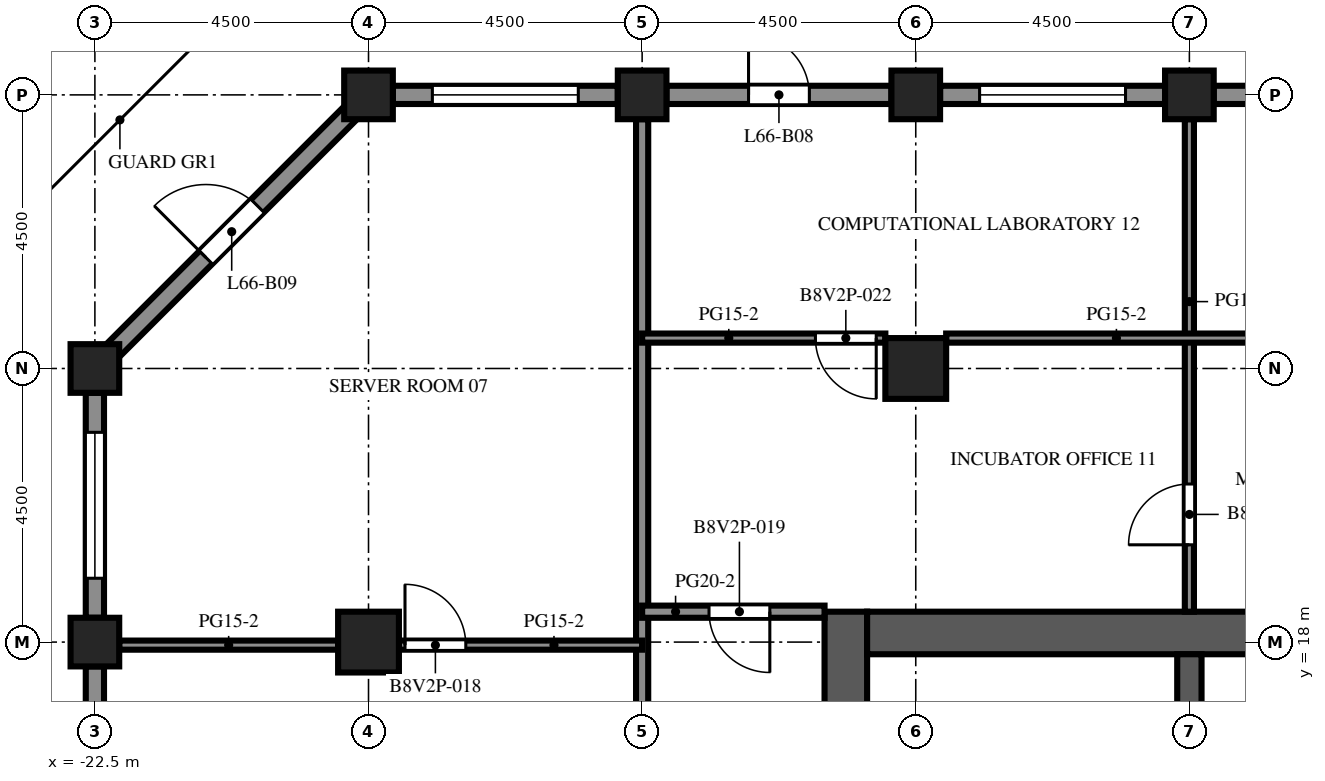
"""IFC4 building model, lengths in metres.
Left out: names, types, materials, properties, quantities, classifications, styles, units other than length and angle.
Written with IfcOpenShell. Run it as: python <this file> out.ifc"""

import sys

from ifc_helpers import new_model, si_unit, direction, frame, frame_2d, origin, origin_2d, place, context, subcontext, project, spatial, rectangle, extrude, element, fill, save


model = new_model("IFC4")
c1 = context("Model", 3, precision=1e-05, world=origin(), true_north=direction((0.0, 1.0)))
c2 = subcontext(c1, "Body", "Model", "MODEL_VIEW")
j1 = project(units=[si_unit("LENGTHUNIT", "METRE"), si_unit("PLANEANGLEUNIT", "RADIAN")], contexts=[c1])
p1 = place(None, origin())
s1 = spatial("IfcSite", under=j1, at=p1, CompositionType="ELEMENT")
p2 = place(p1, origin())
s2 = spatial("IfcBuilding", under=s1, at=p2, CompositionType="ELEMENT")
p3 = place(p2, frame((0.0, 0.0, 290.9)))
s3 = spatial("IfcBuildingStorey", under=s2, at=p3, CompositionType="ELEMENT", Elevation=290.9)
for number, where, z_axis, x_axis in (
    (1, (-22.5, 18.0, 0.0), (0.0, 0.0, 1.0), (1.0, 0.0, 0.0)),
    (2, (-22.5, 22.5, 0.0), (0.0, 0.0, 1.0), (1.0, 0.0, 0.0)),
    (3, (-18.0, 27.0, 0.0), (0.0, 0.0, 1.0), (1.0, 0.0, 0.0)),
    (4, (-13.5, 27.0, 0.0), (0.0, 0.0, 1.0), (1.0, 0.0, 0.0)),
    (5, (-9.0, 27.0, 0.0), (0.0, 0.0, 1.0), (1.0, 0.0, 0.0)),
    (6, (-4.5, 27.0, 0.0), (0.0, 0.0, 1.0), (1.0, 0.0, 0.0)),
):
    element("IfcColumn", number, at=place(p3, frame(where, z_axis=z_axis, x_axis=x_axis)), inside=s3, PredefinedType="COLUMN", context=c2, shape_type="SweptSolid", body=[
        extrude(rectangle(XDim=0.8, YDim=0.8, at=origin_2d()), origin(), (0.0, 0.0, 1.0), 4.1),
    ])
for number, where, z_axis, x_axis in (
    (7, (-18.0, 18.0, 0.0), (0.0, 0.0, 1.0), (1.0, 0.0, 0.0)),
    (8, (-9.0, 22.5, 0.0), (0.0, 0.0, 1.0), (1.0, 0.0, 0.0)),
):
    element("IfcColumn", number, at=place(p3, frame(where, z_axis=z_axis, x_axis=x_axis)), inside=s3, PredefinedType="COLUMN", context=c2, shape_type="SweptSolid", body=[
        extrude(rectangle(XDim=1.0, YDim=1.0, at=origin_2d()), origin(), (0.0, 0.0, 1.0), 4.1),
    ])
p4 = place(p3, frame((-10.15, -9.0, 0.0), z_axis=(0.0, 0.0, 1.0), x_axis=(0.0, 1.0, 0.0)))
e9 = element("IfcWall", 9, at=p4, inside=s3, PredefinedType="SHEAR", context=c2, shape_type="SweptSolid", body=[
    extrude(rectangle(XDim=27.5, YDim=0.7, at=frame_2d((13.75, 0.0))), origin(), (0.0, 0.0, 1.0), 4.1),
])
p5 = place(p4, frame((12.55, 0.0, 0.0)))
e10 = element("IfcOpeningElement", 10, at=p5, cuts=e9, PredefinedType="OPENING", context=c2, shape_type="SweptSolid", body=[
    extrude(rectangle(XDim=2.4, YDim=2.4, at=frame_2d((1.2, 1.2))), frame((0.0, 0.36, 0.0), z_axis=(0.0, -1.0, 0.0), x_axis=(1.0, 0.0, 0.0)), (0.0, 0.0, 1.0), 0.72),
])
p6 = place(p4, frame((6.825, 0.0, 0.0)))
e11 = element("IfcOpeningElement", 11, at=p6, cuts=e9, PredefinedType="OPENING", context=c2, shape_type="SweptSolid", body=[
    extrude(rectangle(XDim=1.2, YDim=2.1, at=frame_2d((0.6, 1.05))), frame((0.0, 0.36, 0.0), z_axis=(0.0, -1.0, 0.0), x_axis=(1.0, 0.0, 0.0)), (0.0, 0.0, 1.0), 0.72),
])
p7 = place(p4, frame((19.475, 0.0, 0.0)))
e12 = element("IfcOpeningElement", 12, at=p7, cuts=e9, PredefinedType="OPENING", context=c2, shape_type="SweptSolid", body=[
    extrude(rectangle(XDim=1.2, YDim=2.1, at=frame_2d((0.6, 1.05))), frame((0.0, 0.36, 0.0), z_axis=(0.0, -1.0, 0.0), x_axis=(1.0, 0.0, 0.0)), (0.0, 0.0, 1.0), 0.72),
])
p8 = place(p3, frame((-9.8, 18.15, 0.0), z_axis=(0.0, 0.0, 1.0), x_axis=(1.0, 0.0, 0.0)))
e13 = element("IfcWall", 13, at=p8, inside=s3, PredefinedType="SHEAR", context=c2, shape_type="SweptSolid", body=[
    extrude(rectangle(XDim=10.6, YDim=0.7, at=frame_2d((5.3, 0.0))), origin(), (0.0, 0.0, 1.0), 4.1),
])
p9 = place(p3, frame((-4.5, 10.2, 0.0), z_axis=(0.0, 0.0, 1.0), x_axis=(0.0, 1.0, 0.0)))
e14 = element("IfcWall", 14, at=p9, inside=s3, PredefinedType="SHEAR", context=c2, shape_type="SweptSolid", body=[
    extrude(rectangle(XDim=7.6, YDim=0.4, at=frame_2d((3.8, 0.0))), origin(), (0.0, 0.0, 1.0), 4.1),
])
p10 = place(p3, frame((-4.1, 27.0, 0.0), z_axis=(0.0, 0.0, 1.0), x_axis=(1.0, 0.0, 0.0)))
e15 = element("IfcWall", 15, at=p10, inside=s3, PredefinedType="SOLIDWALL", context=c2, shape_type="SweptSolid", body=[
    extrude(rectangle(XDim=3.7, YDim=0.3, at=frame_2d((1.85, 0.0))), origin(), (0.0, 0.0, 1.0), 2.7),
])
p11 = place(p10, frame((0.65, 0.0, 0.8)))
e16 = element("IfcOpeningElement", 16, at=p11, cuts=e15, PredefinedType="OPENING", context=c2, shape_type="SweptSolid", body=[
    extrude(rectangle(XDim=2.4, YDim=1.7, at=frame_2d((1.2, 0.85))), frame((0.0, 0.16, 0.0), z_axis=(0.0, -1.0, 0.0), x_axis=(1.0, 0.0, 0.0)), (0.0, 0.0, 1.0), 0.32),
])
p12 = place(p3, frame((-8.6, 27.0, 0.0), z_axis=(0.0, 0.0, 1.0), x_axis=(1.0, 0.0, 0.0)))
e17 = element("IfcWall", 17, at=p12, inside=s3, PredefinedType="SOLIDWALL", context=c2, shape_type="SweptSolid", body=[
    extrude(rectangle(XDim=3.7, YDim=0.3, at=frame_2d((1.85, 0.0))), origin(), (0.0, 0.0, 1.0), 2.7),
])
p13 = place(p12, frame((0.65, 0.0, 0.8)))
e18 = element("IfcOpeningElement", 18, at=p13, cuts=e17, PredefinedType="OPENING", context=c2, shape_type="SweptSolid", body=[
    extrude(rectangle(XDim=2.4, YDim=1.7, at=frame_2d((1.2, 0.85))), frame((0.0, 0.16, 0.0), z_axis=(0.0, -1.0, 0.0), x_axis=(1.0, 0.0, 0.0)), (0.0, 0.0, 1.0), 0.32),
])
p14 = place(p3, frame((-13.1, 27.0, 0.0), z_axis=(0.0, 0.0, 1.0), x_axis=(1.0, 0.0, 0.0)))
e19 = element("IfcWall", 19, at=p14, inside=s3, PredefinedType="SOLIDWALL", context=c2, shape_type="SweptSolid", body=[
    extrude(rectangle(XDim=3.7, YDim=0.3, at=frame_2d((1.85, 0.0))), origin(), (0.0, 0.0, 1.0), 2.7),
])
p15 = place(p14, frame((1.35, 0.0, 0.0)))
e20 = element("IfcOpeningElement", 20, at=p15, cuts=e19, PredefinedType="OPENING", context=c2, shape_type="SweptSolid", body=[
    extrude(rectangle(XDim=1.0, YDim=2.2, at=frame_2d((0.5, 1.1))), frame((0.0, 0.16, 0.0), z_axis=(0.0, -1.0, 0.0), x_axis=(1.0, 0.0, 0.0)), (0.0, 0.0, 1.0), 0.32),
])
p16 = place(p3, frame((-17.6, 27.0, 0.0), z_axis=(0.0, 0.0, 1.0), x_axis=(1.0, 0.0, 0.0)))
e21 = element("IfcWall", 21, at=p16, inside=s3, PredefinedType="SOLIDWALL", context=c2, shape_type="SweptSolid", body=[
    extrude(rectangle(XDim=3.7, YDim=0.3, at=frame_2d((1.85, 0.0))), origin(), (0.0, 0.0, 1.0), 2.7),
])
p17 = place(p16, frame((0.65, 0.0, 0.8)))
e22 = element("IfcOpeningElement", 22, at=p17, cuts=e21, PredefinedType="OPENING", context=c2, shape_type="SweptSolid", body=[
    extrude(rectangle(XDim=2.4, YDim=1.7, at=frame_2d((1.2, 0.85))), frame((0.0, 0.16, 0.0), z_axis=(0.0, -1.0, 0.0), x_axis=(1.0, 0.0, 0.0)), (0.0, 0.0, 1.0), 0.32),
])
p18 = place(p3, frame((-22.206, 22.794, 0.0), z_axis=(0.0, 0.0, 1.0), x_axis=(0.707106781187, 0.707106781187, 0.0)))
e23 = element("IfcWall", 23, at=p18, inside=s3, PredefinedType="SOLIDWALL", context=c2, shape_type="SweptSolid", body=[
    extrude(rectangle(XDim=5.532, YDim=0.3, at=frame_2d((2.766, 0.0))), origin(), (0.0, 0.0, 1.0), 2.7),
])
p19 = place(p18, frame((2.166, 0.0, 0.0)))
e24 = element("IfcOpeningElement", 24, at=p19, cuts=e23, PredefinedType="OPENING", context=c2, shape_type="SweptSolid", body=[
    extrude(rectangle(XDim=1.2, YDim=2.2, at=frame_2d((0.6, 1.1))), frame((0.0, 0.16, 0.0), z_axis=(0.0, -1.0, 0.0), x_axis=(1.0, 0.0, 0.0)), (0.0, 0.0, 1.0), 0.32),
])
p20 = place(p3, frame((-22.5, 18.4, 0.0), z_axis=(0.0, 0.0, 1.0), x_axis=(0.0, 1.0, 0.0)))
e25 = element("IfcWall", 25, at=p20, inside=s3, PredefinedType="SOLIDWALL", context=c2, shape_type="SweptSolid", body=[
    extrude(rectangle(XDim=3.7, YDim=0.3, at=frame_2d((1.85, 0.0))), origin(), (0.0, 0.0, 1.0), 2.7),
])
p21 = place(p20, frame((0.65, 0.0, 0.8)))
e26 = element("IfcOpeningElement", 26, at=p21, cuts=e25, PredefinedType="OPENING", context=c2, shape_type="SweptSolid", body=[
    extrude(rectangle(XDim=2.4, YDim=1.7, at=frame_2d((1.2, 0.85))), frame((0.0, 0.16, 0.0), z_axis=(0.0, -1.0, 0.0), x_axis=(1.0, 0.0, 0.0)), (0.0, 0.0, 1.0), 0.32),
])
p22 = place(p3, frame((-22.5, 13.9, 0.0), z_axis=(0.0, 0.0, 1.0), x_axis=(0.0, 1.0, 0.0)))
e27 = element("IfcWall", 27, at=p22, inside=s3, PredefinedType="SOLIDWALL", context=c2, shape_type="SweptSolid", body=[
    extrude(rectangle(XDim=3.7, YDim=0.3, at=frame_2d((1.85, 0.0))), origin(), (0.0, 0.0, 1.0), 2.7),
])
p23 = place(p22, frame((1.35, 0.0, 0.0)))
e28 = element("IfcOpeningElement", 28, at=p23, cuts=e27, PredefinedType="OPENING", context=c2, shape_type="SweptSolid", body=[
    extrude(rectangle(XDim=1.0, YDim=2.2, at=frame_2d((0.5, 1.1))), frame((0.0, 0.16, 0.0), z_axis=(0.0, -1.0, 0.0), x_axis=(1.0, 0.0, 0.0)), (0.0, 0.0, 1.0), 0.32),
])
p24 = place(p3, frame((-13.5, 6.25, 0.0), z_axis=(0.0, 0.0, 1.0), x_axis=(0.0, 1.0, 0.0)))
e29 = element("IfcWall", 29, at=p24, inside=s3, PredefinedType="PARTITIONING", context=c2, shape_type="SweptSolid", body=[
    extrude(rectangle(XDim=20.35, YDim=0.2, at=frame_2d((10.175, 0.0))), origin(), (0.0, 0.0, 1.0), 3.5),
])
p25 = place(p3, frame((-4.5, 26.6, 0.0), z_axis=(0.0, 0.0, 1.0), x_axis=(0.0, -1.0, 0.0)))
e30 = element("IfcWall", 30, at=p25, inside=s3, PredefinedType="PARTITIONING", context=c2, shape_type="SweptSolid", body=[
    extrude(rectangle(XDim=8.1, YDim=0.15, at=frame_2d((4.05, 0.0))), origin(), (0.0, 0.0, 1.0), 3.5),
])
p26 = place(p25, frame((6.0, 0.0, 0.0)))
e31 = element("IfcOpeningElement", 31, at=p26, cuts=e30, PredefinedType="OPENING", context=c2, shape_type="SweptSolid", body=[
    extrude(rectangle(XDim=1.0, YDim=2.1, at=frame_2d((0.5, 1.05))), frame((0.0, 0.085, 0.0), z_axis=(0.0, -1.0, 0.0), x_axis=(1.0, 0.0, 0.0)), (0.0, 0.0, 1.0), 0.17),
])
p27 = place(p3, frame((-22.1, 17.95, 0.0), z_axis=(0.0, 0.0, 1.0), x_axis=(1.0, 0.0, 0.0)))
e32 = element("IfcWall", 32, at=p27, inside=s3, PredefinedType="PARTITIONING", context=c2, shape_type="SweptSolid", body=[
    extrude(rectangle(XDim=3.6, YDim=0.15, at=frame_2d((1.8, 0.0))), origin(), (0.0, 0.0, 1.0), 3.5),
])
p28 = place(p3, frame((-17.5, 17.95, 0.0), z_axis=(0.0, 0.0, 1.0), x_axis=(1.0, 0.0, 0.0)))
e33 = element("IfcWall", 33, at=p28, inside=s3, PredefinedType="PARTITIONING", context=c2, shape_type="SweptSolid", body=[
    extrude(rectangle(XDim=4.0, YDim=0.15, at=frame_2d((2.0, 0.0))), origin(), (0.0, 0.0, 1.0), 3.5),
])
p29 = place(p28, frame((0.1, 0.0, 0.0)))
e34 = element("IfcOpeningElement", 34, at=p29, cuts=e33, PredefinedType="OPENING", context=c2, shape_type="SweptSolid", body=[
    extrude(rectangle(XDim=1.0, YDim=2.1, at=frame_2d((0.5, 1.05))), frame((0.0, 0.085, 0.0), z_axis=(0.0, -1.0, 0.0), x_axis=(1.0, 0.0, 0.0)), (0.0, 0.0, 1.0), 0.17),
])
p30 = place(p3, frame((-13.5, 18.5, 0.0), z_axis=(0.0, 0.0, 1.0), x_axis=(1.0, 0.0, 0.0)))
e35 = element("IfcWall", 35, at=p30, inside=s3, PredefinedType="PARTITIONING", context=c2, shape_type="SweptSolid", body=[
    extrude(rectangle(XDim=3.0, YDim=0.2, at=frame_2d((1.5, 0.0))), origin(), (0.0, 0.0, 1.0), 3.5),
])
p31 = place(p30, frame((1.1, 0.0, 0.0)))
e36 = element("IfcOpeningElement", 36, at=p31, cuts=e35, PredefinedType="OPENING", context=c2, shape_type="SweptSolid", body=[
    extrude(rectangle(XDim=1.0, YDim=2.1, at=frame_2d((0.5, 1.05))), frame((0.0, 0.11, 0.0), z_axis=(0.0, -1.0, 0.0), x_axis=(1.0, 0.0, 0.0)), (0.0, 0.0, 1.0), 0.22),
])
p32 = place(p3, frame((-13.5, 23.0, 0.0), z_axis=(0.0, 0.0, 1.0), x_axis=(1.0, 0.0, 0.0)))
e37 = element("IfcWall", 37, at=p32, inside=s3, PredefinedType="PARTITIONING", context=c2, shape_type="SweptSolid", body=[
    extrude(rectangle(XDim=4.0, YDim=0.15, at=frame_2d((2.0, 0.0))), origin(), (0.0, 0.0, 1.0), 3.5),
])
p33 = place(p32, frame((2.85, 0.0, 0.0)))
e38 = element("IfcOpeningElement", 38, at=p33, cuts=e37, PredefinedType="OPENING", context=c2, shape_type="SweptSolid", body=[
    extrude(rectangle(XDim=1.0, YDim=2.1, at=frame_2d((0.5, 1.05))), frame((0.0, 0.085, 0.0), z_axis=(0.0, -1.0, 0.0), x_axis=(1.0, 0.0, 0.0)), (0.0, 0.0, 1.0), 0.17),
])
p34 = place(p3, frame((-8.5, 23.0, 0.0), z_axis=(0.0, 0.0, 1.0), x_axis=(1.0, 0.0, 0.0)))
e39 = element("IfcWall", 39, at=p34, inside=s3, PredefinedType="PARTITIONING", context=c2, shape_type="SweptSolid", body=[
    extrude(rectangle(XDim=8.0, YDim=0.15, at=frame_2d((4.0, 0.0))), origin(), (0.0, 0.0, 1.0), 3.5),
])
p35 = place(p34, frame((5.6, 0.0, 0.0)))
e40 = element("IfcOpeningElement", 40, at=p35, cuts=e39, PredefinedType="OPENING", context=c2, shape_type="SweptSolid", body=[
    extrude(rectangle(XDim=1.0, YDim=2.1, at=frame_2d((0.5, 1.05))), frame((0.0, 0.085, 0.0), z_axis=(0.0, -1.0, 0.0), x_axis=(1.0, 0.0, 0.0)), (0.0, 0.0, 1.0), 0.17),
])
p36 = place(p13, origin())
e41 = element("IfcWindow", 41, at=p36, inside=s3, PartitioningType="SINGLE_PANEL", PredefinedType="WINDOW", context=c2, shape_type="SweptSolid", body=[
    extrude(rectangle(XDim=2.4, YDim=1.7, at=frame_2d((1.2, 0.85))), frame((0.0, 0.03, 0.0), z_axis=(0.0, -1.0, 0.0), x_axis=(1.0, 0.0, 0.0)), (0.0, 0.0, 1.0), 0.06),
])
fill(e18, e41)
p37 = place(p15, origin())
e42 = element("IfcDoor", 42, at=p37, inside=s3, OperationType="SINGLE_SWING_LEFT", PredefinedType="DOOR", context=c2, shape_type="SweptSolid", body=[
    extrude(rectangle(XDim=1.0, YDim=2.2, at=frame_2d((0.5, 1.1))), frame((0.0, 0.025, 0.0), z_axis=(0.0, -1.0, 0.0), x_axis=(1.0, 0.0, 0.0)), (0.0, 0.0, 1.0), 0.05),
])
fill(e20, e42)
p38 = place(p17, origin())
e43 = element("IfcWindow", 43, at=p38, inside=s3, PartitioningType="SINGLE_PANEL", PredefinedType="WINDOW", context=c2, shape_type="SweptSolid", body=[
    extrude(rectangle(XDim=2.4, YDim=1.7, at=frame_2d((1.2, 0.85))), frame((0.0, 0.03, 0.0), z_axis=(0.0, -1.0, 0.0), x_axis=(1.0, 0.0, 0.0)), (0.0, 0.0, 1.0), 0.06),
])
fill(e22, e43)
p39 = place(p19, origin())
e44 = element("IfcDoor", 44, at=p39, inside=s3, OperationType="SINGLE_SWING_LEFT", PredefinedType="DOOR", context=c2, shape_type="SweptSolid", body=[
    extrude(rectangle(XDim=1.2, YDim=2.2, at=frame_2d((0.6, 1.1))), frame((0.0, 0.025, 0.0), z_axis=(0.0, -1.0, 0.0), x_axis=(1.0, 0.0, 0.0)), (0.0, 0.0, 1.0), 0.05),
])
fill(e24, e44)
p40 = place(p21, origin())
e45 = element("IfcWindow", 45, at=p40, inside=s3, PartitioningType="SINGLE_PANEL", PredefinedType="WINDOW", context=c2, shape_type="SweptSolid", body=[
    extrude(rectangle(XDim=2.4, YDim=1.7, at=frame_2d((1.2, 0.85))), frame((0.0, 0.03, 0.0), z_axis=(0.0, -1.0, 0.0), x_axis=(1.0, 0.0, 0.0)), (0.0, 0.0, 1.0), 0.06),
])
fill(e26, e45)
p41 = place(p26, origin())
e46 = element("IfcDoor", 46, at=p41, inside=s3, OperationType="SINGLE_SWING_RIGHT", PredefinedType="DOOR", context=c2, shape_type="SweptSolid", body=[
    extrude(rectangle(XDim=1.0, YDim=2.1, at=frame_2d((0.5, 1.05))), frame((0.0, 0.025, 0.0), z_axis=(0.0, -1.0, 0.0), x_axis=(1.0, 0.0, 0.0)), (0.0, 0.0, 1.0), 0.05),
])
fill(e31, e46)
p42 = place(p29, origin())
e47 = element("IfcDoor", 47, at=p42, inside=s3, OperationType="SINGLE_SWING_LEFT", PredefinedType="DOOR", context=c2, shape_type="SweptSolid", body=[
    extrude(rectangle(XDim=1.0, YDim=2.1, at=frame_2d((0.5, 1.05))), frame((0.0, 0.025, 0.0), z_axis=(0.0, -1.0, 0.0), x_axis=(1.0, 0.0, 0.0)), (0.0, 0.0, 1.0), 0.05),
])
fill(e34, e47)
p43 = place(p31, origin())
e48 = element("IfcDoor", 48, at=p43, inside=s3, OperationType="SINGLE_SWING_RIGHT", PredefinedType="DOOR", context=c2, shape_type="SweptSolid", body=[
    extrude(rectangle(XDim=1.0, YDim=2.1, at=frame_2d((0.5, 1.05))), frame((0.0, 0.025, 0.0), z_axis=(0.0, -1.0, 0.0), x_axis=(1.0, 0.0, 0.0)), (0.0, 0.0, 1.0), 0.05),
])
fill(e36, e48)
p44 = place(p33, origin())
e49 = element("IfcDoor", 49, at=p44, inside=s3, OperationType="SINGLE_SWING_RIGHT", PredefinedType="DOOR", context=c2, shape_type="SweptSolid", body=[
    extrude(rectangle(XDim=1.0, YDim=2.1, at=frame_2d((0.5, 1.05))), frame((0.0, 0.025, 0.0), z_axis=(0.0, -1.0, 0.0), x_axis=(1.0, 0.0, 0.0)), (0.0, 0.0, 1.0), 0.05),
])
fill(e38, e49)
save(model, sys.argv[1])
